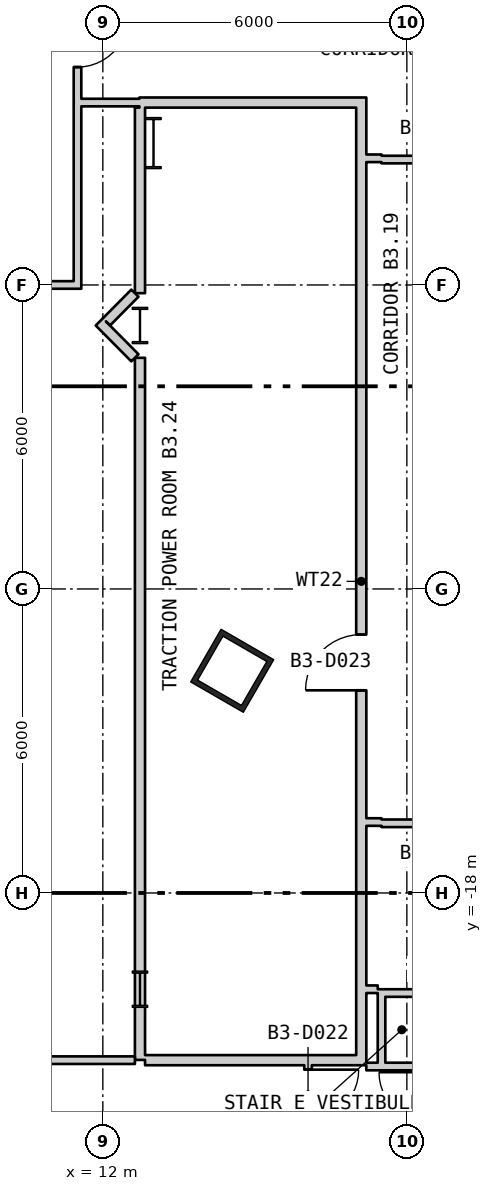
"""IFC4 building model, lengths in metres.
Left out: names, types, materials, properties, quantities, classifications, styles, units other than length and angle.
Written with IfcOpenShell. Run it as: python <this file> out.ifc"""

import sys

from ifc_helpers import new_model, si_unit, direction, frame, frame_2d, origin, origin_2d, place, context, subcontext, project, spatial, rectangle, hollow_rectangle, i_section, extrude, element, fill, save


model = new_model("IFC4")
c1 = context("Model", 3, precision=1e-05, world=origin(), true_north=direction((0.0, 1.0)))
c2 = subcontext(c1, "Body", "Model", "MODEL_VIEW")
j1 = project(units=[si_unit("LENGTHUNIT", "METRE"), si_unit("PLANEANGLEUNIT", "RADIAN")], contexts=[c1])
p1 = place(None, origin())
s1 = spatial("IfcSite", under=j1, at=p1, CompositionType="ELEMENT")
p2 = place(p1, origin())
s2 = spatial("IfcBuilding", under=s1, at=p2, CompositionType="ELEMENT")
p3 = place(p2, frame((0.0, 0.0, -16.8)))
s3 = spatial("IfcBuildingStorey", under=s2, at=p3, CompositionType="ELEMENT", Elevation=-16.8)
p4 = place(p3, frame((14.553, -13.615, 0.0), z_axis=(0.0, 0.0, 1.0), x_axis=(0.5, 0.866025403784, 0.0)))
e1 = element("IfcColumn", 1, at=p4, inside=s3, PredefinedType="COLUMN", context=c2, shape_type="SweptSolid", body=[
    extrude(hollow_rectangle(XDim=1.2, YDim=1.2, WallThickness=0.1, at=origin_2d()), origin(), (0.0, 0.0, 1.0), 5.4),
])
p5 = place(p3, frame((13.0, -3.2, 0.0), z_axis=(0.0, 0.0, 1.0), x_axis=(1.0, 0.0, 0.0)))
e2 = element("IfcColumn", 2, at=p5, inside=s3, PredefinedType="COLUMN", context=c2, shape_type="SweptSolid", body=[
    extrude(i_section(OverallWidth=0.302, OverallDepth=1.008, WebThickness=0.021, FlangeThickness=0.04, at=origin_2d()), origin(), (0.0, 0.0, 1.0), 5.4),
])
for number, where, z_axis, x_axis in (
    (3, (12.733, -6.8, 0.0), (0.0, 0.0, 1.0), (1.0, 0.0, 0.0)),
    (4, (12.733, -19.9, 0.0), (0.0, 0.0, 1.0), (1.0, 0.0, 0.0)),
):
    element("IfcColumn", number, at=place(p3, frame(where, z_axis=z_axis, x_axis=x_axis)), inside=s3, PredefinedType="COLUMN", context=c2, shape_type="SweptSolid", body=[
        extrude(i_section(OverallWidth=0.304, OverallDepth=0.716, WebThickness=0.021, FlangeThickness=0.04, at=origin_2d()), origin(), (0.0, 0.0, 1.0), 5.4),
    ])
p6 = place(p3, frame((1.7, -21.3, 0.0), z_axis=(0.0, 0.0, 1.0), x_axis=(1.0, 0.0, 0.0)))
e5 = element("IfcWall", 5, at=p6, inside=s3, PredefinedType="PARTITIONING", context=c2, shape_type="SweptSolid", body=[
    extrude(rectangle(XDim=10.933, YDim=0.15, at=frame_2d((5.466, 0.0))), origin(), (0.0, 0.0, 1.0), 4.95),
])
p7 = place(p3, frame((9.125, -6.0, 0.0), z_axis=(0.0, 0.0, 1.0), x_axis=(1.0, 0.0, 0.0)))
e6 = element("IfcWall", 6, at=p7, inside=s3, PredefinedType="PARTITIONING", context=c2, shape_type="SweptSolid", body=[
    extrude(rectangle(XDim=2.3, YDim=0.15, at=frame_2d((1.15, 0.0))), origin(), (0.0, 0.0, 1.0), 4.95),
])
p8 = place(p3, frame((11.5, -6.075, 0.0), z_axis=(0.0, 0.0, 1.0), x_axis=(0.0, 1.0, 0.0)))
e7 = element("IfcWall", 7, at=p8, inside=s3, PredefinedType="PARTITIONING", context=c2, shape_type="SweptSolid", body=[
    extrude(rectangle(XDim=6.075, YDim=0.15, at=frame_2d((3.038, 0.0))), origin(), (0.0, 0.0, 1.0), 4.95),
])
p9 = place(p8, frame((4.375, 0.0, 0.0)))
e8 = element("IfcOpeningElement", 8, at=p9, cuts=e7, PredefinedType="OPENING", context=c2, shape_type="SweptSolid", body=[
    extrude(rectangle(XDim=1.0, YDim=2.1, at=frame_2d((0.5, 1.05))), frame((0.0, 0.085, 0.0), z_axis=(0.0, -1.0, 0.0), x_axis=(1.0, 0.0, 0.0)), (0.0, 0.0, 1.0), 0.17),
])
p10 = place(p3, frame((11.575, -2.4, 0.0), z_axis=(0.0, 0.0, 1.0), x_axis=(1.0, 0.0, 0.0)))
e9 = element("IfcWall", 9, at=p10, inside=s3, PredefinedType="PARTITIONING", context=c2, shape_type="SweptSolid", body=[
    extrude(rectangle(XDim=1.147, YDim=0.15, at=frame_2d((0.574, 0.0))), origin(), (0.0, 0.0, 1.0), 4.95),
])
p11 = place(p3, frame((11.93, -6.729, 0.0), z_axis=(0.0, 0.0, 1.0), x_axis=(0.704095721434, -0.710105073252, 0.0)))
e10 = element("IfcWall", 10, at=p11, inside=s3, PredefinedType="PARTITIONING", context=c2, shape_type="SweptSolid", body=[
    extrude(rectangle(XDim=0.998, YDim=0.2, at=frame_2d((0.499, 0.0))), origin(), (0.0, 0.0, 1.0), 4.95),
])
p12 = place(p3, frame((12.071, -6.729, 0.0), z_axis=(0.0, 0.0, 1.0), x_axis=(0.703968315265, 0.710231378568, 0.0)))
e11 = element("IfcWall", 11, at=p12, inside=s3, PredefinedType="PARTITIONING", context=c2, shape_type="SweptSolid", body=[
    extrude(rectangle(XDim=0.798, YDim=0.2, at=frame_2d((0.399, 0.0))), origin(), (0.0, 0.0, 1.0), 4.95),
])
p13 = place(p3, frame((12.722, -2.4, 0.0), z_axis=(0.0, 0.0, 1.0), x_axis=(1.0, 0.0, 0.0)))
e12 = element("IfcWall", 12, at=p13, inside=s3, PredefinedType="PARTITIONING", context=c2, shape_type="SweptSolid", body=[
    extrude(rectangle(XDim=4.278, YDim=0.2, at=frame_2d((2.139, 0.0))), origin(), (0.0, 0.0, 1.0), 4.95),
])
p14 = place(p3, frame((12.733, -21.295, 0.0), z_axis=(0.0, 0.0, 1.0), x_axis=(0.0, 1.0, 0.0)))
e13 = element("IfcWall", 13, at=p14, inside=s3, PredefinedType="PARTITIONING", context=c2, shape_type="SweptSolid", body=[
    extrude(rectangle(XDim=13.857, YDim=0.2, at=frame_2d((6.928, 0.0))), origin(), (0.0, 0.0, 1.0), 4.95),
])
p15 = place(p3, frame((12.733, -6.162, 0.0), z_axis=(0.0, 0.0, 1.0), x_axis=(0.0, 1.0, 0.0)))
e14 = element("IfcWall", 14, at=p15, inside=s3, PredefinedType="PARTITIONING", context=c2, shape_type="SweptSolid", body=[
    extrude(rectangle(XDim=3.662, YDim=0.2, at=frame_2d((1.831, 0.0))), origin(), (0.0, 0.0, 1.0), 4.95),
])
p16 = place(p3, frame((12.833, -21.3, 0.0), z_axis=(0.0, 0.0, 1.0), x_axis=(1.0, 0.0, 0.0)))
e15 = element("IfcWall", 15, at=p16, inside=s3, PredefinedType="PARTITIONING", context=c2, shape_type="SweptSolid", body=[
    extrude(rectangle(XDim=4.167, YDim=0.2, at=frame_2d((2.083, 0.0))), origin(), (0.0, 0.0, 1.0), 4.95),
])
p17 = place(p3, frame((16.05, -23.55, 0.0), z_axis=(0.0, 0.0, 1.0), x_axis=(0.0, 1.0, 0.0)))
e16 = element("IfcWall", 16, at=p17, inside=s3, PredefinedType="PARTITIONING", context=c2, shape_type="SweptSolid", body=[
    extrude(rectangle(XDim=2.15, YDim=0.15, at=frame_2d((1.075, 0.0))), origin(), (0.0, 0.0, 1.0), 4.95),
])
p18 = place(p17, frame((1.063, 0.0, 0.0)))
e17 = element("IfcOpeningElement", 17, at=p18, cuts=e16, PredefinedType="OPENING", context=c2, shape_type="SweptSolid", body=[
    extrude(rectangle(XDim=1.0, YDim=2.1, at=frame_2d((0.5, 1.05))), frame((0.0, 0.085, 0.0), z_axis=(0.0, -1.0, 0.0), x_axis=(1.0, 0.0, 0.0)), (0.0, 0.0, 1.0), 0.17),
])
p19 = place(p3, frame((17.1, -21.4, 0.0), z_axis=(0.0, 0.0, 1.0), x_axis=(0.0, 1.0, 0.0)))
e18 = element("IfcWall", 18, at=p19, inside=s3, PredefinedType="PARTITIONING", context=c2, shape_type="SweptSolid", body=[
    extrude(rectangle(XDim=19.1, YDim=0.2, at=frame_2d((9.55, 0.0))), origin(), (0.0, 0.0, 1.0), 4.95),
])
p20 = place(p19, frame((7.4, 0.0, 0.0)))
e19 = element("IfcOpeningElement", 19, at=p20, cuts=e18, PredefinedType="OPENING", context=c2, shape_type="SweptSolid", body=[
    extrude(rectangle(XDim=1.1, YDim=2.1, at=frame_2d((0.55, 1.05))), frame((0.0, 0.11, 0.0), z_axis=(0.0, -1.0, 0.0), x_axis=(1.0, 0.0, 0.0)), (0.0, 0.0, 1.0), 0.22),
])
for number, where, z_axis, x_axis in (
    (20, (17.2, -21.425, 0.0), (0.0, 0.0, 1.0), (1.0, 0.0, 0.0)),
    (21, (17.2, -19.9, 0.0), (0.0, 0.0, 1.0), (1.0, 0.0, 0.0)),
):
    element("IfcWall", number, at=place(p3, frame(where, z_axis=z_axis, x_axis=x_axis)), inside=s3, PredefinedType="PARTITIONING", context=c2, shape_type="SweptSolid", body=[
        extrude(rectangle(XDim=0.225, YDim=0.15, at=frame_2d((0.113, 0.0))), origin(), (0.0, 0.0, 1.0), 4.95),
    ])
for number, where, z_axis, x_axis in (
    (22, (17.2, -16.6, 0.0), (0.0, 0.0, 1.0), (1.0, 0.0, 0.0)),
    (23, (17.2, -3.5, 0.0), (0.0, 0.0, 1.0), (1.0, 0.0, 0.0)),
):
    element("IfcWall", number, at=place(p3, frame(where, z_axis=z_axis, x_axis=x_axis)), inside=s3, PredefinedType="PARTITIONING", context=c2, shape_type="SweptSolid", body=[
        extrude(rectangle(XDim=0.3, YDim=0.15, at=frame_2d((0.15, 0.0))), origin(), (0.0, 0.0, 1.0), 4.95),
    ])
p21 = place(p3, frame((17.5, -21.5, 0.0), z_axis=(0.0, 0.0, 1.0), x_axis=(0.0, 1.0, 0.0)))
e24 = element("IfcWall", 24, at=p21, inside=s3, PredefinedType="PARTITIONING", context=c2, shape_type="SweptSolid", body=[
    extrude(rectangle(XDim=1.6, YDim=0.15, at=frame_2d((0.8, 0.0))), origin(), (0.0, 0.0, 1.0), 4.95),
])
p22 = place(p3, frame((17.5, -16.625, 0.0), z_axis=(0.0, 0.0, 1.0), x_axis=(1.0, 0.0, 0.0)))
e25 = element("IfcWall", 25, at=p22, inside=s3, PredefinedType="PARTITIONING", context=c2, shape_type="SweptSolid", body=[
    extrude(rectangle(XDim=2.325, YDim=0.15, at=frame_2d((1.163, 0.0))), origin(), (0.0, 0.0, 1.0), 4.95),
])
p23 = place(p22, frame((0.662, 0.0, 0.0)))
e26 = element("IfcOpeningElement", 26, at=p23, cuts=e25, PredefinedType="OPENING", context=c2, shape_type="SweptSolid", body=[
    extrude(rectangle(XDim=1.0, YDim=2.1, at=frame_2d((0.5, 1.05))), frame((0.0, 0.085, 0.0), z_axis=(0.0, -1.0, 0.0), x_axis=(1.0, 0.0, 0.0)), (0.0, 0.0, 1.0), 0.17),
])
p24 = place(p3, frame((17.5, -3.525, 0.0), z_axis=(0.0, 0.0, 1.0), x_axis=(1.0, 0.0, 0.0)))
e27 = element("IfcWall", 27, at=p24, inside=s3, PredefinedType="PARTITIONING", context=c2, shape_type="SweptSolid", body=[
    extrude(rectangle(XDim=2.325, YDim=0.15, at=frame_2d((1.163, 0.0))), origin(), (0.0, 0.0, 1.0), 4.95),
])
p25 = place(p24, frame((0.662, 0.0, 0.0)))
e28 = element("IfcOpeningElement", 28, at=p25, cuts=e27, PredefinedType="OPENING", context=c2, shape_type="SweptSolid", body=[
    extrude(rectangle(XDim=1.0, YDim=2.1, at=frame_2d((0.5, 1.05))), frame((0.0, 0.085, 0.0), z_axis=(0.0, -1.0, 0.0), x_axis=(1.0, 0.0, 0.0)), (0.0, 0.0, 1.0), 0.17),
])
for number, where, z_axis, x_axis in (
    (29, (17.575, -21.425, 0.0), (0.0, 0.0, 1.0), (1.0, 0.0, 0.0)),
    (30, (17.575, -19.975, 0.0), (0.0, 0.0, 1.0), (1.0, 0.0, 0.0)),
):
    element("IfcWall", number, at=place(p3, frame(where, z_axis=z_axis, x_axis=x_axis)), inside=s3, PredefinedType="PARTITIONING", context=c2, shape_type="SweptSolid", body=[
        extrude(rectangle(XDim=0.65, YDim=0.15, at=frame_2d((0.325, 0.0))), origin(), (0.0, 0.0, 1.0), 4.95),
    ])
p26 = place(p9, origin())
e31 = element("IfcDoor", 31, at=p26, inside=s3, OperationType="SINGLE_SWING_RIGHT", PredefinedType="DOOR", context=c2, shape_type="SweptSolid", body=[
    extrude(rectangle(XDim=1.0, YDim=2.1, at=frame_2d((0.5, 1.05))), frame((0.0, 0.025, 0.0), z_axis=(0.0, -1.0, 0.0), x_axis=(1.0, 0.0, 0.0)), (0.0, 0.0, 1.0), 0.05),
])
fill(e8, e31)
p27 = place(p18, origin())
e32 = element("IfcDoor", 32, at=p27, inside=s3, OperationType="SINGLE_SWING_RIGHT", PredefinedType="DOOR", context=c2, shape_type="SweptSolid", body=[
    extrude(rectangle(XDim=1.0, YDim=2.1, at=frame_2d((0.5, 1.05))), frame((0.0, 0.025, 0.0), z_axis=(0.0, -1.0, 0.0), x_axis=(1.0, 0.0, 0.0)), (0.0, 0.0, 1.0), 0.05),
])
fill(e17, e32)
p28 = place(p20, origin())
e33 = element("IfcDoor", 33, at=p28, inside=s3, OperationType="SINGLE_SWING_RIGHT", PredefinedType="DOOR", context=c2, shape_type="SweptSolid", body=[
    extrude(rectangle(XDim=1.1, YDim=2.1, at=frame_2d((0.55, 1.05))), frame((0.0, 0.025, 0.0), z_axis=(0.0, -1.0, 0.0), x_axis=(1.0, 0.0, 0.0)), (0.0, 0.0, 1.0), 0.05),
])
fill(e19, e33)
save(model, sys.argv[1])
